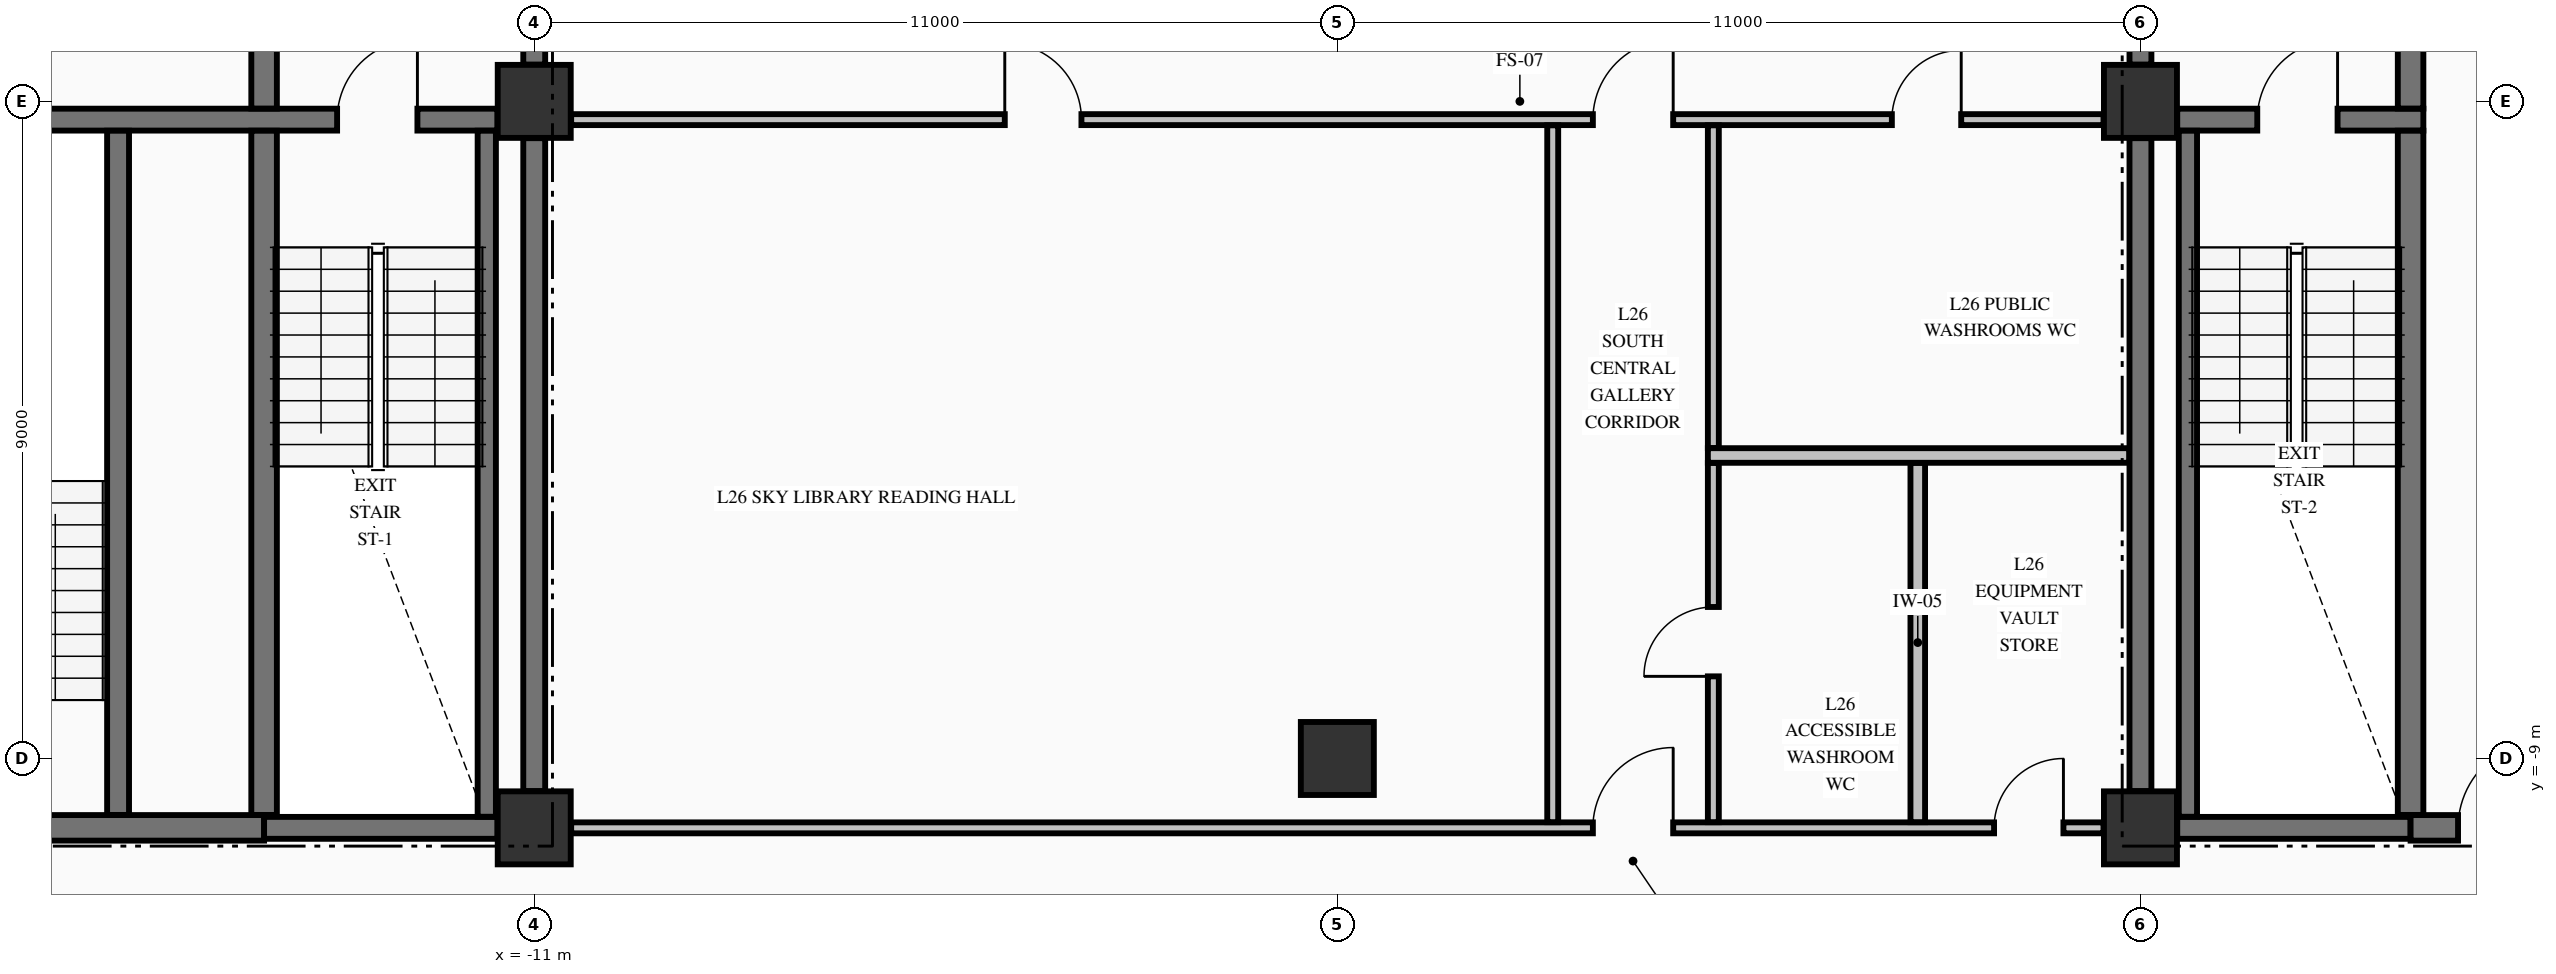
"""IFC4 building model, lengths in metres.
Left out: names, types, materials, properties, quantities, classifications, styles, units other than length and angle.
Written with IfcOpenShell. Run it as: python <this file> out.ifc"""

import sys

from ifc_helpers import new_model, si_unit, direction, frame, frame_2d, origin, origin_2d, place, context, subcontext, project, spatial, rectangle, extrude, element, fill, save


model = new_model("IFC4")
c1 = context("Model", 3, precision=1e-05, world=origin(), true_north=direction((0.0, 1.0)))
c2 = subcontext(c1, "Body", "Model", "MODEL_VIEW")
j1 = project(units=[si_unit("LENGTHUNIT", "METRE"), si_unit("PLANEANGLEUNIT", "RADIAN")], contexts=[c1])
p1 = place(None, origin())
s1 = spatial("IfcSite", under=j1, at=p1, CompositionType="ELEMENT")
p2 = place(p1, origin())
s2 = spatial("IfcBuilding", under=s1, at=p2, CompositionType="ELEMENT")
p3 = place(p2, frame((0.0, 0.0, 105.64)))
s3 = spatial("IfcBuildingStorey", under=s2, at=p3, CompositionType="ELEMENT", Elevation=105.64)
for number, where, z_axis, x_axis in (
    (1, (-11.0, -9.95, -0.25), (0.0, 0.0, 1.0), (1.0, 0.0, 0.0)),
    (2, (-11.0, 0.0, -0.25), (0.0, 0.0, 1.0), (1.0, 0.0, 0.0)),
    (3, (11.0, -9.95, -0.25), (0.0, 0.0, 1.0), (1.0, 0.0, 0.0)),
    (4, (11.0, 0.0, -0.25), (0.0, 0.0, 1.0), (1.0, 0.0, 0.0)),
    (5, (0.0, -9.0, -0.25), (0.0, 0.0, 1.0), (1.0, 0.0, 0.0)),
):
    element("IfcColumn", number, at=place(p3, frame(where, z_axis=z_axis, x_axis=x_axis)), inside=s3, PredefinedType="COLUMN", context=c2, shape_type="SweptSolid", body=[
        extrude(rectangle(XDim=1.0, YDim=1.0, at=origin_2d()), origin(), (0.0, 0.0, 1.0), 3.57),
    ])
p4 = place(p3, frame((-19.496, -9.95, 0.0), z_axis=(0.0, 0.0, 1.0), x_axis=(1.0, 0.0, 0.0)))
e6 = element("IfcWall", 6, at=p4, inside=s3, PredefinedType="SHEAR", context=c2, shape_type="SweptSolid", body=[
    extrude(rectangle(XDim=4.796, YDim=0.35, at=frame_2d((2.398, 0.0))), origin(), (0.0, 0.0, 1.0), 3.32),
])
p5 = place(p4, frame((0.671, 0.0, 0.0)))
e7 = element("IfcOpeningElement", 7, at=p5, cuts=e6, PredefinedType="OPENING", context=c2, shape_type="SweptSolid", body=[
    extrude(rectangle(XDim=1.05, YDim=2.15, at=frame_2d((0.525, 1.075))), frame((0.0, 0.185, 0.0), z_axis=(0.0, -1.0, 0.0), x_axis=(1.0, 0.0, 0.0)), (0.0, 0.0, 1.0), 0.37),
])
for number, where, z_axis, x_axis in (
    (8, (-14.7, -9.95, 0.0), (0.0, 0.0, 1.0), (1.0, 0.0, 0.0)),
    (9, (11.504, -9.95, 0.0), (0.0, 0.0, 1.0), (1.0, 0.0, 0.0)),
):
    element("IfcWall", number, at=place(p3, frame(where, z_axis=z_axis, x_axis=x_axis)), inside=s3, PredefinedType="SHEAR", context=c2, shape_type="SweptSolid", body=[
        extrude(rectangle(XDim=3.196, YDim=0.3, at=frame_2d((1.598, 0.0))), origin(), (0.0, 0.0, 1.0), 3.32),
    ])
p6 = place(p3, frame((14.7, -9.95, 0.0), z_axis=(0.0, 0.0, 1.0), x_axis=(1.0, 0.0, 0.0)))
e10 = element("IfcWall", 10, at=p6, inside=s3, PredefinedType="SHEAR", context=c2, shape_type="SweptSolid", body=[
    extrude(rectangle(XDim=4.796, YDim=0.35, at=frame_2d((2.398, 0.0))), origin(), (0.0, 0.0, 1.0), 3.32),
])
p7 = place(p6, frame((0.65, 0.0, 0.0)))
e11 = element("IfcOpeningElement", 11, at=p7, cuts=e10, PredefinedType="OPENING", context=c2, shape_type="SweptSolid", body=[
    extrude(rectangle(XDim=1.2, YDim=2.15, at=frame_2d((0.6, 1.075))), frame((0.0, 0.185, 0.0), z_axis=(0.0, -1.0, 0.0), x_axis=(1.0, 0.0, 0.0)), (0.0, 0.0, 1.0), 0.37),
])
p8 = place(p3, frame((-19.496, -0.25, 0.0), z_axis=(0.0, 0.0, 1.0), x_axis=(1.0, 0.0, 0.0)))
e12 = element("IfcWall", 12, at=p8, inside=s3, PredefinedType="SHEAR", context=c2, shape_type="SweptSolid", body=[
    extrude(rectangle(XDim=7.992, YDim=0.3, at=frame_2d((3.996, 0.0))), origin(), (0.0, 0.0, 1.0), 3.32),
])
p9 = place(p8, frame((5.796, 0.0, 0.0)))
e13 = element("IfcOpeningElement", 13, at=p9, cuts=e12, PredefinedType="OPENING", context=c2, shape_type="SweptSolid", body=[
    extrude(rectangle(XDim=1.1, YDim=2.15, at=frame_2d((0.55, 1.075))), frame((0.0, 0.16, 0.0), z_axis=(0.0, -1.0, 0.0), x_axis=(1.0, 0.0, 0.0)), (0.0, 0.0, 1.0), 0.32),
])
p10 = place(p3, frame((11.504, -0.25, 0.0), z_axis=(0.0, 0.0, 1.0), x_axis=(1.0, 0.0, 0.0)))
e14 = element("IfcWall", 14, at=p10, inside=s3, PredefinedType="SHEAR", context=c2, shape_type="SweptSolid", body=[
    extrude(rectangle(XDim=3.371, YDim=0.3, at=frame_2d((1.686, 0.0))), origin(), (0.0, 0.0, 1.0), 3.32),
])
p11 = place(p10, frame((1.096, 0.0, 0.0)))
e15 = element("IfcOpeningElement", 15, at=p11, cuts=e14, PredefinedType="OPENING", context=c2, shape_type="SweptSolid", body=[
    extrude(rectangle(XDim=1.1, YDim=2.15, at=frame_2d((0.55, 1.075))), frame((0.0, 0.16, 0.0), z_axis=(0.0, -1.0, 0.0), x_axis=(1.0, 0.0, 0.0)), (0.0, 0.0, 1.0), 0.32),
])
p12 = place(p3, frame((-10.494, -9.95, 0.0), z_axis=(0.0, 0.0, 1.0), x_axis=(1.0, 0.0, 0.0)))
e16 = element("IfcWall", 16, at=p12, inside=s3, PredefinedType="PARTITIONING", context=c2, shape_type="SweptSolid", body=[
    extrude(rectangle(XDim=20.988, YDim=0.15, at=frame_2d((10.494, 0.0))), origin(), (0.0, 0.0, 1.0), 3.32),
])
p13 = place(p12, frame((13.994, 0.0, 0.0)))
e17 = element("IfcOpeningElement", 17, at=p13, cuts=e16, PredefinedType="OPENING", context=c2, shape_type="SweptSolid", body=[
    extrude(rectangle(XDim=1.1, YDim=2.15, at=frame_2d((0.55, 1.075))), frame((0.0, 0.085, 0.0), z_axis=(0.0, -1.0, 0.0), x_axis=(1.0, 0.0, 0.0)), (0.0, 0.0, 1.0), 0.17),
])
p14 = place(p12, frame((19.489, 0.0, 0.0)))
e18 = element("IfcOpeningElement", 18, at=p14, cuts=e16, PredefinedType="OPENING", context=c2, shape_type="SweptSolid", body=[
    extrude(rectangle(XDim=0.95, YDim=2.15, at=frame_2d((0.475, 1.075))), frame((0.0, 0.085, 0.0), z_axis=(0.0, -1.0, 0.0), x_axis=(1.0, 0.0, 0.0)), (0.0, 0.0, 1.0), 0.17),
])
p15 = place(p3, frame((5.075, -4.85, 0.0), z_axis=(0.0, 0.0, 1.0), x_axis=(1.0, 0.0, 0.0)))
e19 = element("IfcWall", 19, at=p15, inside=s3, PredefinedType="PARTITIONING", context=c2, shape_type="SweptSolid", body=[
    extrude(rectangle(XDim=5.772, YDim=0.2, at=frame_2d((2.886, 0.0))), origin(), (0.0, 0.0, 1.0), 3.32),
])
p16 = place(p3, frame((-10.494, -0.25, 0.0), z_axis=(0.0, 0.0, 1.0), x_axis=(1.0, 0.0, 0.0)))
e20 = element("IfcWall", 20, at=p16, inside=s3, PredefinedType="PARTITIONING", context=c2, shape_type="SweptSolid", body=[
    extrude(rectangle(XDim=20.988, YDim=0.15, at=frame_2d((10.494, 0.0))), origin(), (0.0, 0.0, 1.0), 3.32),
])
p17 = place(p16, frame((13.994, 0.0, 0.0)))
e21 = element("IfcOpeningElement", 21, at=p17, cuts=e20, PredefinedType="OPENING", context=c2, shape_type="SweptSolid", body=[
    extrude(rectangle(XDim=1.1, YDim=2.15, at=frame_2d((0.55, 1.075))), frame((0.0, 0.085, 0.0), z_axis=(0.0, -1.0, 0.0), x_axis=(1.0, 0.0, 0.0)), (0.0, 0.0, 1.0), 0.17),
])
p18 = place(p16, frame((5.939, 0.0, 0.0)))
e22 = element("IfcOpeningElement", 22, at=p18, cuts=e20, PredefinedType="OPENING", context=c2, shape_type="SweptSolid", body=[
    extrude(rectangle(XDim=1.05, YDim=2.15, at=frame_2d((0.525, 1.075))), frame((0.0, 0.085, 0.0), z_axis=(0.0, -1.0, 0.0), x_axis=(1.0, 0.0, 0.0)), (0.0, 0.0, 1.0), 0.17),
])
p19 = place(p16, frame((18.089, 0.0, 0.0)))
e23 = element("IfcOpeningElement", 23, at=p19, cuts=e20, PredefinedType="OPENING", context=c2, shape_type="SweptSolid", body=[
    extrude(rectangle(XDim=0.95, YDim=2.15, at=frame_2d((0.475, 1.075))), frame((0.0, 0.085, 0.0), z_axis=(0.0, -1.0, 0.0), x_axis=(1.0, 0.0, 0.0)), (0.0, 0.0, 1.0), 0.17),
])
p20 = place(p3, frame((-16.7, -9.773, 0.0), z_axis=(0.0, 0.0, 1.0), x_axis=(0.0, 1.0, 0.0)))
e24 = element("IfcWall", 24, at=p20, inside=s3, PredefinedType="SHEAR", context=c2, shape_type="SweptSolid", body=[
    extrude(rectangle(XDim=9.371, YDim=0.3, at=frame_2d((4.686, 0.0))), origin(), (0.0, 0.0, 1.0), 3.32),
])
p21 = place(p3, frame((-14.7, -9.773, 0.0), z_axis=(0.0, 0.0, 1.0), x_axis=(0.0, 1.0, 0.0)))
e25 = element("IfcWall", 25, at=p21, inside=s3, PredefinedType="SHEAR", context=c2, shape_type="SweptSolid", body=[
    extrude(rectangle(XDim=9.371, YDim=0.35, at=frame_2d((4.686, 0.0))), origin(), (0.0, 0.0, 1.0), 3.32),
])
p22 = place(p3, frame((-14.7, -0.098, 0.0), z_axis=(0.0, 0.0, 1.0), x_axis=(0.0, 1.0, 0.0)))
e26 = element("IfcWall", 26, at=p22, inside=s3, PredefinedType="SHEAR", context=c2, shape_type="SweptSolid", body=[
    extrude(rectangle(XDim=2.846, YDim=0.35, at=frame_2d((1.423, 0.0))), origin(), (0.0, 0.0, 1.0), 3.32),
])
p23 = place(p3, frame((-11.65, -9.798, 0.0), z_axis=(0.0, 0.0, 1.0), x_axis=(0.0, 1.0, 0.0)))
e27 = element("IfcWall", 27, at=p23, inside=s3, PredefinedType="SOLIDWALL", context=c2, shape_type="SweptSolid", body=[
    extrude(rectangle(XDim=9.396, YDim=0.25, at=frame_2d((4.698, 0.0))), origin(), (0.0, 0.0, 1.0), 3.32),
])
p24 = place(p3, frame((-11.0, -9.446, 0.0), z_axis=(0.0, 0.0, 1.0), x_axis=(0.0, 1.0, 0.0)))
e28 = element("IfcWall", 28, at=p24, inside=s3, PredefinedType="SHEAR", context=c2, shape_type="SweptSolid", body=[
    extrude(rectangle(XDim=8.942, YDim=0.3, at=frame_2d((4.471, 0.0))), origin(), (0.0, 0.0, 1.0), 3.32),
])
p25 = place(p3, frame((-11.0, 0.504, 0.0), z_axis=(0.0, 0.0, 1.0), x_axis=(0.0, 1.0, 0.0)))
e29 = element("IfcWall", 29, at=p25, inside=s3, PredefinedType="SHEAR", context=c2, shape_type="SweptSolid", body=[
    extrude(rectangle(XDim=2.244, YDim=0.3, at=frame_2d((1.122, 0.0))), origin(), (0.0, 0.0, 1.0), 3.32),
])
p26 = place(p25, frame((0.596, 0.0, 0.0)))
e30 = element("IfcOpeningElement", 30, at=p26, cuts=e29, PredefinedType="OPENING", context=c2, shape_type="SweptSolid", body=[
    extrude(rectangle(XDim=1.1, YDim=2.15, at=frame_2d((0.55, 1.075))), frame((0.0, 0.16, 0.0), z_axis=(0.0, -1.0, 0.0), x_axis=(1.0, 0.0, 0.0)), (0.0, 0.0, 1.0), 0.32),
])
p27 = place(p3, frame((11.0, -9.446, 0.0), z_axis=(0.0, 0.0, 1.0), x_axis=(0.0, 1.0, 0.0)))
e31 = element("IfcWall", 31, at=p27, inside=s3, PredefinedType="SHEAR", context=c2, shape_type="SweptSolid", body=[
    extrude(rectangle(XDim=8.942, YDim=0.3, at=frame_2d((4.471, 0.0))), origin(), (0.0, 0.0, 1.0), 3.32),
])
p28 = place(p3, frame((11.0, 0.504, 0.0), z_axis=(0.0, 0.0, 1.0), x_axis=(0.0, 1.0, 0.0)))
e32 = element("IfcWall", 32, at=p28, inside=s3, PredefinedType="SHEAR", context=c2, shape_type="SweptSolid", body=[
    extrude(rectangle(XDim=2.244, YDim=0.3, at=frame_2d((1.122, 0.0))), origin(), (0.0, 0.0, 1.0), 3.32),
])
p29 = place(p28, frame((0.596, 0.0, 0.0)))
e33 = element("IfcOpeningElement", 33, at=p29, cuts=e32, PredefinedType="OPENING", context=c2, shape_type="SweptSolid", body=[
    extrude(rectangle(XDim=1.1, YDim=2.15, at=frame_2d((0.55, 1.075))), frame((0.0, 0.16, 0.0), z_axis=(0.0, -1.0, 0.0), x_axis=(1.0, 0.0, 0.0)), (0.0, 0.0, 1.0), 0.32),
])
p30 = place(p3, frame((11.65, -9.798, 0.0), z_axis=(0.0, 0.0, 1.0), x_axis=(0.0, 1.0, 0.0)))
e34 = element("IfcWall", 34, at=p30, inside=s3, PredefinedType="SOLIDWALL", context=c2, shape_type="SweptSolid", body=[
    extrude(rectangle(XDim=9.396, YDim=0.25, at=frame_2d((4.698, 0.0))), origin(), (0.0, 0.0, 1.0), 3.32),
])
p31 = place(p3, frame((14.7, -9.773, 0.0), z_axis=(0.0, 0.0, 1.0), x_axis=(0.0, 1.0, 0.0)))
e35 = element("IfcWall", 35, at=p31, inside=s3, PredefinedType="SHEAR", context=c2, shape_type="SweptSolid", body=[
    extrude(rectangle(XDim=9.371, YDim=0.35, at=frame_2d((4.686, 0.0))), origin(), (0.0, 0.0, 1.0), 3.32),
])
p32 = place(p3, frame((14.7, -0.098, 0.0), z_axis=(0.0, 0.0, 1.0), x_axis=(0.0, 1.0, 0.0)))
e36 = element("IfcWall", 36, at=p32, inside=s3, PredefinedType="SHEAR", context=c2, shape_type="SweptSolid", body=[
    extrude(rectangle(XDim=2.846, YDim=0.35, at=frame_2d((1.423, 0.0))), origin(), (0.0, 0.0, 1.0), 3.32),
])
p33 = place(p3, frame((2.95, -9.872, 0.0), z_axis=(0.0, 0.0, 1.0), x_axis=(0.0, 1.0, 0.0)))
e37 = element("IfcWall", 37, at=p33, inside=s3, PredefinedType="PARTITIONING", context=c2, shape_type="SweptSolid", body=[
    extrude(rectangle(XDim=9.544, YDim=0.15, at=frame_2d((4.772, 0.0))), origin(), (0.0, 0.0, 1.0), 3.32),
])
p34 = place(p3, frame((5.15, -9.872, 0.0), z_axis=(0.0, 0.0, 1.0), x_axis=(0.0, 1.0, 0.0)))
e38 = element("IfcWall", 38, at=p34, inside=s3, PredefinedType="PARTITIONING", context=c2, shape_type="SweptSolid", body=[
    extrude(rectangle(XDim=4.919, YDim=0.15, at=frame_2d((2.459, 0.0))), origin(), (0.0, 0.0, 1.0), 3.32),
])
p35 = place(p34, frame((1.997, 0.0, 0.0)))
e39 = element("IfcOpeningElement", 39, at=p35, cuts=e38, PredefinedType="OPENING", context=c2, shape_type="SweptSolid", body=[
    extrude(rectangle(XDim=0.95, YDim=2.15, at=frame_2d((0.475, 1.075))), frame((0.0, 0.085, 0.0), z_axis=(0.0, -1.0, 0.0), x_axis=(1.0, 0.0, 0.0)), (0.0, 0.0, 1.0), 0.17),
])
p36 = place(p3, frame((5.15, -4.747, 0.0), z_axis=(0.0, 0.0, 1.0), x_axis=(0.0, 1.0, 0.0)))
e40 = element("IfcWall", 40, at=p36, inside=s3, PredefinedType="PARTITIONING", context=c2, shape_type="SweptSolid", body=[
    extrude(rectangle(XDim=4.419, YDim=0.15, at=frame_2d((2.209, 0.0))), origin(), (0.0, 0.0, 1.0), 3.32),
])
p37 = place(p3, frame((7.95, -9.872, 0.0), z_axis=(0.0, 0.0, 1.0), x_axis=(0.0, 1.0, 0.0)))
e41 = element("IfcWall", 41, at=p37, inside=s3, PredefinedType="PARTITIONING", context=c2, shape_type="SweptSolid", body=[
    extrude(rectangle(XDim=4.919, YDim=0.2, at=frame_2d((2.459, 0.0))), origin(), (0.0, 0.0, 1.0), 3.32),
])
p38 = place(p9, origin())
e42 = element("IfcDoor", 42, at=p38, inside=s3, OperationType="SINGLE_SWING_RIGHT", PredefinedType="DOOR", context=c2, shape_type="SweptSolid", body=[
    extrude(rectangle(XDim=1.1, YDim=2.15, at=frame_2d((0.55, 1.075))), frame((0.0, 0.025, 0.0), z_axis=(0.0, -1.0, 0.0), x_axis=(1.0, 0.0, 0.0)), (0.0, 0.0, 1.0), 0.05),
])
fill(e13, e42)
p39 = place(p11, origin())
e43 = element("IfcDoor", 43, at=p39, inside=s3, OperationType="SINGLE_SWING_RIGHT", PredefinedType="DOOR", context=c2, shape_type="SweptSolid", body=[
    extrude(rectangle(XDim=1.1, YDim=2.15, at=frame_2d((0.55, 1.075))), frame((0.0, 0.025, 0.0), z_axis=(0.0, -1.0, 0.0), x_axis=(1.0, 0.0, 0.0)), (0.0, 0.0, 1.0), 0.05),
])
fill(e15, e43)
p40 = place(p7, origin())
e44 = element("IfcDoor", 44, at=p40, inside=s3, OperationType="SINGLE_SWING_RIGHT", PredefinedType="DOOR", context=c2, shape_type="SweptSolid", body=[
    extrude(rectangle(XDim=1.2, YDim=2.15, at=frame_2d((0.6, 1.075))), frame((0.0, 0.025, 0.0), z_axis=(0.0, -1.0, 0.0), x_axis=(1.0, 0.0, 0.0)), (0.0, 0.0, 1.0), 0.05),
])
fill(e11, e44)
p41 = place(p13, origin())
e45 = element("IfcDoor", 45, at=p41, inside=s3, OperationType="SINGLE_SWING_RIGHT", PredefinedType="DOOR", context=c2, shape_type="SweptSolid", body=[
    extrude(rectangle(XDim=1.1, YDim=2.15, at=frame_2d((0.55, 1.075))), frame((0.0, 0.025, 0.0), z_axis=(0.0, -1.0, 0.0), x_axis=(1.0, 0.0, 0.0)), (0.0, 0.0, 1.0), 0.05),
])
fill(e17, e45)
p42 = place(p17, origin())
e46 = element("IfcDoor", 46, at=p42, inside=s3, OperationType="SINGLE_SWING_RIGHT", PredefinedType="DOOR", context=c2, shape_type="SweptSolid", body=[
    extrude(rectangle(XDim=1.1, YDim=2.15, at=frame_2d((0.55, 1.075))), frame((0.0, 0.025, 0.0), z_axis=(0.0, -1.0, 0.0), x_axis=(1.0, 0.0, 0.0)), (0.0, 0.0, 1.0), 0.05),
])
fill(e21, e46)
p43 = place(p18, origin())
e47 = element("IfcDoor", 47, at=p43, inside=s3, OperationType="SINGLE_SWING_LEFT", PredefinedType="DOOR", context=c2, shape_type="SweptSolid", body=[
    extrude(rectangle(XDim=1.05, YDim=2.15, at=frame_2d((0.525, 1.075))), frame((0.0, 0.025, 0.0), z_axis=(0.0, -1.0, 0.0), x_axis=(1.0, 0.0, 0.0)), (0.0, 0.0, 1.0), 0.05),
])
fill(e22, e47)
p44 = place(p19, origin())
e48 = element("IfcDoor", 48, at=p44, inside=s3, OperationType="SINGLE_SWING_RIGHT", PredefinedType="DOOR", context=c2, shape_type="SweptSolid", body=[
    extrude(rectangle(XDim=0.95, YDim=2.15, at=frame_2d((0.475, 1.075))), frame((0.0, 0.025, 0.0), z_axis=(0.0, -1.0, 0.0), x_axis=(1.0, 0.0, 0.0)), (0.0, 0.0, 1.0), 0.05),
])
fill(e23, e48)
p45 = place(p35, origin())
e49 = element("IfcDoor", 49, at=p45, inside=s3, OperationType="SINGLE_SWING_LEFT", PredefinedType="DOOR", context=c2, shape_type="SweptSolid", body=[
    extrude(rectangle(XDim=0.95, YDim=2.15, at=frame_2d((0.475, 1.075))), frame((0.0, 0.025, 0.0), z_axis=(0.0, -1.0, 0.0), x_axis=(1.0, 0.0, 0.0)), (0.0, 0.0, 1.0), 0.05),
])
fill(e39, e49)
p46 = place(p14, origin())
e50 = element("IfcDoor", 50, at=p46, inside=s3, OperationType="SINGLE_SWING_RIGHT", PredefinedType="DOOR", context=c2, shape_type="SweptSolid", body=[
    extrude(rectangle(XDim=0.95, YDim=2.15, at=frame_2d((0.475, 1.075))), frame((0.0, 0.025, 0.0), z_axis=(0.0, -1.0, 0.0), x_axis=(1.0, 0.0, 0.0)), (0.0, 0.0, 1.0), 0.05),
])
fill(e18, e50)
save(model, sys.argv[1])
